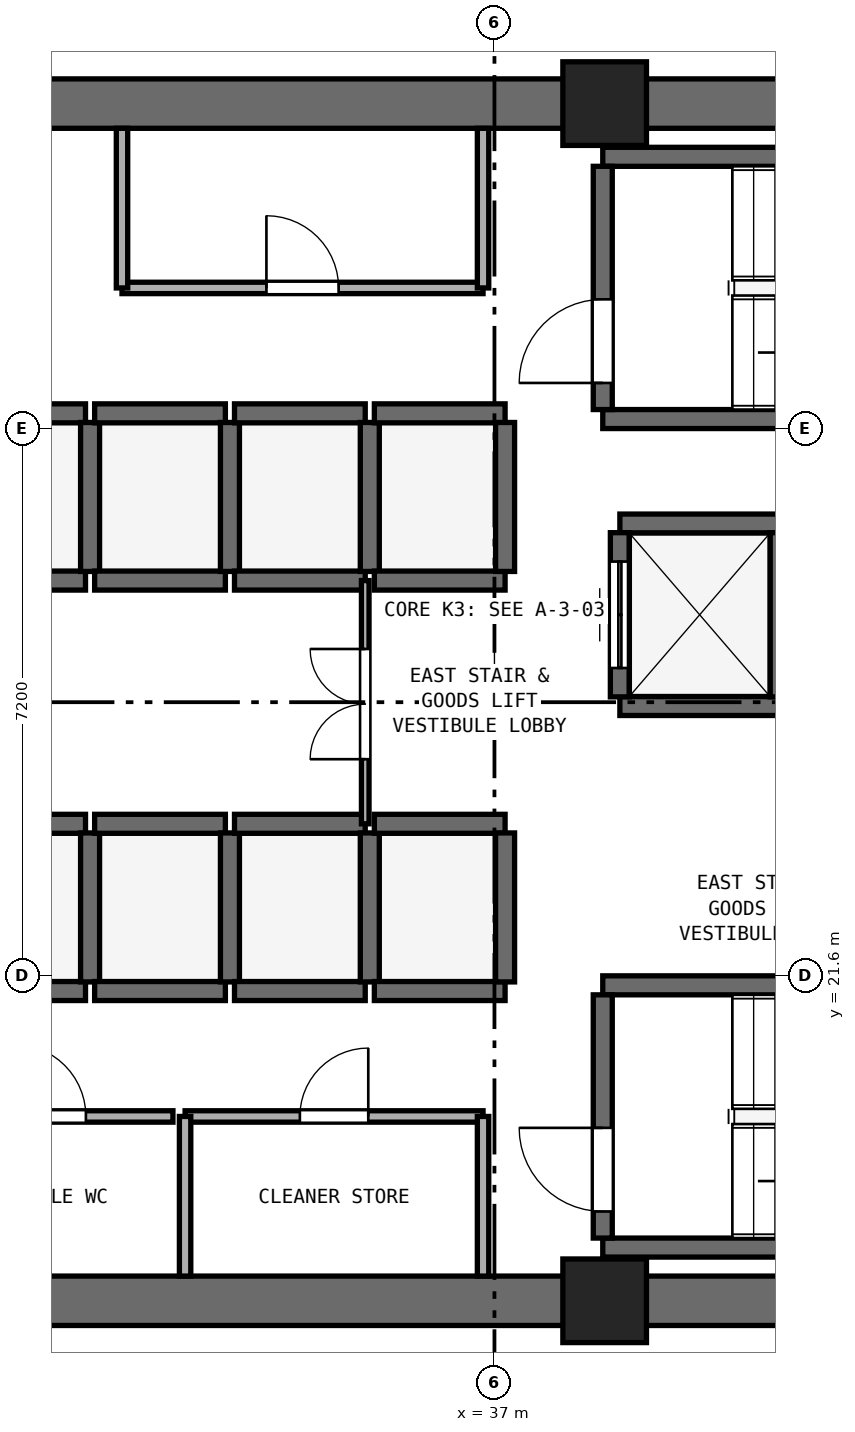
"""IFC4 building model, lengths in metres.
Left out: names, types, materials, properties, quantities, classifications, styles, units other than length and angle.
Written with IfcOpenShell. Run it as: python <this file> out.ifc"""

import sys

from ifc_helpers import new_model, si_unit, direction, frame, frame_2d, origin, origin_2d, place, context, subcontext, project, spatial, rectangle, extrude, element, fill, save


model = new_model("IFC4")
c1 = context("Model", 3, precision=1e-05, world=origin(), true_north=direction((0.0, 1.0)))
c2 = subcontext(c1, "Body", "Model", "MODEL_VIEW")
j1 = project(units=[si_unit("LENGTHUNIT", "METRE"), si_unit("PLANEANGLEUNIT", "RADIAN")], contexts=[c1])
p1 = place(None, origin())
s1 = spatial("IfcSite", under=j1, at=p1, CompositionType="ELEMENT")
p2 = place(p1, origin())
s2 = spatial("IfcBuilding", under=s1, at=p2, CompositionType="ELEMENT")
p3 = place(p2, frame((0.0, 0.0, 51.6)))
s3 = spatial("IfcBuildingStorey", under=s2, at=p3, CompositionType="ELEMENT", Elevation=51.6)
for number, where, z_axis, x_axis in (
    (1, (25.4, 17.325, 0.0), (0.0, 0.0, 1.0), (1.0, 0.0, 0.0)),
    (2, (25.4, 33.075, 0.0), (0.0, 0.0, 1.0), (1.0, 0.0, 0.0)),
):
    element("IfcWall", number, at=place(p3, frame(where, z_axis=z_axis, x_axis=x_axis)), inside=s3, PredefinedType="SHEAR", context=c2, shape_type="SweptSolid", body=[
        extrude(rectangle(XDim=23.2, YDim=0.65, at=frame_2d((11.6, 0.0))), origin(), (0.0, 0.0, 1.0), 3.525),
    ])
for number, where, z_axis, x_axis in (
    (3, (38.45, 17.325, 0.0), (0.0, 0.0, 1.0), (1.0, 0.0, 0.0)),
    (4, (38.45, 33.075, 0.0), (0.0, 0.0, 1.0), (1.0, 0.0, 0.0)),
):
    element("IfcColumn", number, at=place(p3, frame(where, z_axis=z_axis, x_axis=x_axis)), inside=s3, PredefinedType="PILASTER", context=c2, shape_type="SweptSolid", body=[
        extrude(rectangle(XDim=1.1, YDim=1.1, at=origin_2d()), origin(), (0.0, 0.0, 1.0), 3.8),
    ])
for number, where, z_axis, x_axis in (
    (5, (38.425, 28.925, 0.0), (0.0, 0.0, 1.0), (1.0, 0.0, 0.0)),
    (6, (38.425, 32.375, 0.0), (0.0, 0.0, 1.0), (1.0, 0.0, 0.0)),
):
    element("IfcWall", number, at=place(p3, frame(where, z_axis=z_axis, x_axis=x_axis)), inside=s3, PredefinedType="SHEAR", context=c2, shape_type="SweptSolid", body=[
        extrude(rectangle(XDim=7.3, YDim=0.25, at=frame_2d((3.65, 0.0))), origin(), (0.0, 0.0, 1.0), 3.525),
    ])
p4 = place(p3, frame((38.425, 29.05, 0.0), z_axis=(0.0, 0.0, 1.0), x_axis=(0.0, 1.0, 0.0)))
e7 = element("IfcWall", 7, at=p4, inside=s3, PredefinedType="SHEAR", context=c2, shape_type="SweptSolid", body=[
    extrude(rectangle(XDim=3.2, YDim=0.25, at=frame_2d((1.6, 0.0))), origin(), (0.0, 0.0, 1.0), 3.525),
])
p5 = place(p4, frame((0.35, 0.0, 0.0)))
e8 = element("IfcOpeningElement", 8, at=p5, cuts=e7, PredefinedType="OPENING", context=c2, shape_type="SweptSolid", body=[
    extrude(rectangle(XDim=1.1, YDim=2.15, at=frame_2d((0.55, 1.075))), frame((0.0, 0.135, 0.0), z_axis=(0.0, -1.0, 0.0), x_axis=(1.0, 0.0, 0.0)), (0.0, 0.0, 1.0), 0.27),
])
for number, where, z_axis, x_axis in (
    (9, (38.425, 18.025, 0.0), (0.0, 0.0, 1.0), (1.0, 0.0, 0.0)),
    (10, (38.425, 21.475, 0.0), (0.0, 0.0, 1.0), (1.0, 0.0, 0.0)),
):
    element("IfcWall", number, at=place(p3, frame(where, z_axis=z_axis, x_axis=x_axis)), inside=s3, PredefinedType="SHEAR", context=c2, shape_type="SweptSolid", body=[
        extrude(rectangle(XDim=7.3, YDim=0.25, at=frame_2d((3.65, 0.0))), origin(), (0.0, 0.0, 1.0), 3.525),
    ])
p6 = place(p3, frame((38.425, 18.15, 0.0), z_axis=(0.0, 0.0, 1.0), x_axis=(0.0, 1.0, 0.0)))
e11 = element("IfcWall", 11, at=p6, inside=s3, PredefinedType="SHEAR", context=c2, shape_type="SweptSolid", body=[
    extrude(rectangle(XDim=3.2, YDim=0.25, at=frame_2d((1.6, 0.0))), origin(), (0.0, 0.0, 1.0), 3.525),
])
p7 = place(p6, frame((0.35, 0.0, 0.0)))
e12 = element("IfcOpeningElement", 12, at=p7, cuts=e11, PredefinedType="OPENING", context=c2, shape_type="SweptSolid", body=[
    extrude(rectangle(XDim=1.1, YDim=2.15, at=frame_2d((0.55, 1.075))), frame((0.0, 0.135, 0.0), z_axis=(0.0, -1.0, 0.0), x_axis=(1.0, 0.0, 0.0)), (0.0, 0.0, 1.0), 0.27),
])
for number, where, z_axis, x_axis in (
    (13, (29.9, 21.4, 0.0), (0.0, 0.0, 1.0), (1.0, 0.0, 0.0)),
    (14, (29.9, 23.6, 0.0), (0.0, 0.0, 1.0), (1.0, 0.0, 0.0)),
):
    element("IfcWall", number, at=place(p3, frame(where, z_axis=z_axis, x_axis=x_axis)), inside=s3, PredefinedType="SHEAR", context=c2, shape_type="SweptSolid", body=[
        extrude(rectangle(XDim=1.72, YDim=0.25, at=frame_2d((0.86, 0.0))), origin(), (0.0, 0.0, 1.0), 3.525),
    ])
p8 = place(p3, frame((31.68, 21.52, 0.0), z_axis=(0.0, 0.0, 1.0), x_axis=(0.0, 1.0, 0.0)))
e15 = element("IfcWall", 15, at=p8, inside=s3, PredefinedType="SHEAR", context=c2, shape_type="SweptSolid", body=[
    extrude(rectangle(XDim=1.96, YDim=0.25, at=frame_2d((0.98, 0.0))), origin(), (0.0, 0.0, 1.0), 3.525),
])
for number, where, z_axis, x_axis in (
    (16, (31.74, 21.4, 0.0), (0.0, 0.0, 1.0), (1.0, 0.0, 0.0)),
    (17, (31.74, 23.6, 0.0), (0.0, 0.0, 1.0), (1.0, 0.0, 0.0)),
):
    element("IfcWall", number, at=place(p3, frame(where, z_axis=z_axis, x_axis=x_axis)), inside=s3, PredefinedType="SHEAR", context=c2, shape_type="SweptSolid", body=[
        extrude(rectangle(XDim=1.72, YDim=0.25, at=frame_2d((0.86, 0.0))), origin(), (0.0, 0.0, 1.0), 3.525),
    ])
p9 = place(p3, frame((33.52, 21.52, 0.0), z_axis=(0.0, 0.0, 1.0), x_axis=(0.0, 1.0, 0.0)))
e18 = element("IfcWall", 18, at=p9, inside=s3, PredefinedType="SHEAR", context=c2, shape_type="SweptSolid", body=[
    extrude(rectangle(XDim=1.96, YDim=0.25, at=frame_2d((0.98, 0.0))), origin(), (0.0, 0.0, 1.0), 3.525),
])
for number, where, z_axis, x_axis in (
    (19, (33.58, 21.4, 0.0), (0.0, 0.0, 1.0), (1.0, 0.0, 0.0)),
    (20, (33.58, 23.6, 0.0), (0.0, 0.0, 1.0), (1.0, 0.0, 0.0)),
):
    element("IfcWall", number, at=place(p3, frame(where, z_axis=z_axis, x_axis=x_axis)), inside=s3, PredefinedType="SHEAR", context=c2, shape_type="SweptSolid", body=[
        extrude(rectangle(XDim=1.72, YDim=0.25, at=frame_2d((0.86, 0.0))), origin(), (0.0, 0.0, 1.0), 3.525),
    ])
p10 = place(p3, frame((35.36, 21.52, 0.0), z_axis=(0.0, 0.0, 1.0), x_axis=(0.0, 1.0, 0.0)))
e21 = element("IfcWall", 21, at=p10, inside=s3, PredefinedType="SHEAR", context=c2, shape_type="SweptSolid", body=[
    extrude(rectangle(XDim=1.96, YDim=0.25, at=frame_2d((0.98, 0.0))), origin(), (0.0, 0.0, 1.0), 3.525),
])
for number, where, z_axis, x_axis in (
    (22, (35.42, 21.4, 0.0), (0.0, 0.0, 1.0), (1.0, 0.0, 0.0)),
    (23, (35.42, 23.6, 0.0), (0.0, 0.0, 1.0), (1.0, 0.0, 0.0)),
):
    element("IfcWall", number, at=place(p3, frame(where, z_axis=z_axis, x_axis=x_axis)), inside=s3, PredefinedType="SHEAR", context=c2, shape_type="SweptSolid", body=[
        extrude(rectangle(XDim=1.72, YDim=0.25, at=frame_2d((0.86, 0.0))), origin(), (0.0, 0.0, 1.0), 3.525),
    ])
p11 = place(p3, frame((37.14, 21.52, 0.0), z_axis=(0.0, 0.0, 1.0), x_axis=(0.0, 1.0, 0.0)))
e24 = element("IfcWall", 24, at=p11, inside=s3, PredefinedType="SHEAR", context=c2, shape_type="SweptSolid", body=[
    extrude(rectangle(XDim=1.96, YDim=0.25, at=frame_2d((0.98, 0.0))), origin(), (0.0, 0.0, 1.0), 3.525),
])
for number, where, z_axis, x_axis in (
    (25, (29.9, 26.8, 0.0), (0.0, 0.0, 1.0), (1.0, 0.0, 0.0)),
    (26, (29.9, 29.0, 0.0), (0.0, 0.0, 1.0), (1.0, 0.0, 0.0)),
):
    element("IfcWall", number, at=place(p3, frame(where, z_axis=z_axis, x_axis=x_axis)), inside=s3, PredefinedType="SHEAR", context=c2, shape_type="SweptSolid", body=[
        extrude(rectangle(XDim=1.72, YDim=0.25, at=frame_2d((0.86, 0.0))), origin(), (0.0, 0.0, 1.0), 3.525),
    ])
p12 = place(p3, frame((31.68, 26.92, 0.0), z_axis=(0.0, 0.0, 1.0), x_axis=(0.0, 1.0, 0.0)))
e27 = element("IfcWall", 27, at=p12, inside=s3, PredefinedType="SHEAR", context=c2, shape_type="SweptSolid", body=[
    extrude(rectangle(XDim=1.96, YDim=0.25, at=frame_2d((0.98, 0.0))), origin(), (0.0, 0.0, 1.0), 3.525),
])
for number, where, z_axis, x_axis in (
    (28, (31.74, 26.8, 0.0), (0.0, 0.0, 1.0), (1.0, 0.0, 0.0)),
    (29, (31.74, 29.0, 0.0), (0.0, 0.0, 1.0), (1.0, 0.0, 0.0)),
):
    element("IfcWall", number, at=place(p3, frame(where, z_axis=z_axis, x_axis=x_axis)), inside=s3, PredefinedType="SHEAR", context=c2, shape_type="SweptSolid", body=[
        extrude(rectangle(XDim=1.72, YDim=0.25, at=frame_2d((0.86, 0.0))), origin(), (0.0, 0.0, 1.0), 3.525),
    ])
p13 = place(p3, frame((33.52, 26.92, 0.0), z_axis=(0.0, 0.0, 1.0), x_axis=(0.0, 1.0, 0.0)))
e30 = element("IfcWall", 30, at=p13, inside=s3, PredefinedType="SHEAR", context=c2, shape_type="SweptSolid", body=[
    extrude(rectangle(XDim=1.96, YDim=0.25, at=frame_2d((0.98, 0.0))), origin(), (0.0, 0.0, 1.0), 3.525),
])
for number, where, z_axis, x_axis in (
    (31, (33.58, 26.8, 0.0), (0.0, 0.0, 1.0), (1.0, 0.0, 0.0)),
    (32, (33.58, 29.0, 0.0), (0.0, 0.0, 1.0), (1.0, 0.0, 0.0)),
):
    element("IfcWall", number, at=place(p3, frame(where, z_axis=z_axis, x_axis=x_axis)), inside=s3, PredefinedType="SHEAR", context=c2, shape_type="SweptSolid", body=[
        extrude(rectangle(XDim=1.72, YDim=0.25, at=frame_2d((0.86, 0.0))), origin(), (0.0, 0.0, 1.0), 3.525),
    ])
p14 = place(p3, frame((35.36, 26.92, 0.0), z_axis=(0.0, 0.0, 1.0), x_axis=(0.0, 1.0, 0.0)))
e33 = element("IfcWall", 33, at=p14, inside=s3, PredefinedType="SHEAR", context=c2, shape_type="SweptSolid", body=[
    extrude(rectangle(XDim=1.96, YDim=0.25, at=frame_2d((0.98, 0.0))), origin(), (0.0, 0.0, 1.0), 3.525),
])
for number, where, z_axis, x_axis in (
    (34, (35.42, 26.8, 0.0), (0.0, 0.0, 1.0), (1.0, 0.0, 0.0)),
    (35, (35.42, 29.0, 0.0), (0.0, 0.0, 1.0), (1.0, 0.0, 0.0)),
):
    element("IfcWall", number, at=place(p3, frame(where, z_axis=z_axis, x_axis=x_axis)), inside=s3, PredefinedType="SHEAR", context=c2, shape_type="SweptSolid", body=[
        extrude(rectangle(XDim=1.72, YDim=0.25, at=frame_2d((0.86, 0.0))), origin(), (0.0, 0.0, 1.0), 3.525),
    ])
p15 = place(p3, frame((37.14, 26.92, 0.0), z_axis=(0.0, 0.0, 1.0), x_axis=(0.0, 1.0, 0.0)))
e36 = element("IfcWall", 36, at=p15, inside=s3, PredefinedType="SHEAR", context=c2, shape_type="SweptSolid", body=[
    extrude(rectangle(XDim=1.96, YDim=0.25, at=frame_2d((0.98, 0.0))), origin(), (0.0, 0.0, 1.0), 3.525),
])
for number, where, z_axis, x_axis in (
    (37, (38.65, 25.15, 0.0), (0.0, 0.0, 1.0), (1.0, 0.0, 0.0)),
    (38, (38.65, 27.55, 0.0), (0.0, 0.0, 1.0), (1.0, 0.0, 0.0)),
):
    element("IfcWall", number, at=place(p3, frame(where, z_axis=z_axis, x_axis=x_axis)), inside=s3, PredefinedType="SHEAR", context=c2, shape_type="SweptSolid", body=[
        extrude(rectangle(XDim=2.1, YDim=0.25, at=frame_2d((1.05, 0.0))), origin(), (0.0, 0.0, 1.0), 3.525),
    ])
p16 = place(p3, frame((38.65, 25.27, 0.0), z_axis=(0.0, 0.0, 1.0), x_axis=(0.0, 1.0, 0.0)))
e39 = element("IfcWall", 39, at=p16, inside=s3, PredefinedType="SHEAR", context=c2, shape_type="SweptSolid", body=[
    extrude(rectangle(XDim=2.16, YDim=0.25, at=frame_2d((1.08, 0.0))), origin(), (0.0, 0.0, 1.0), 3.525),
])
p17 = place(p16, frame((0.38, 0.0, 0.0)))
e40 = element("IfcOpeningElement", 40, at=p17, cuts=e39, PredefinedType="OPENING", context=c2, shape_type="SweptSolid", body=[
    extrude(rectangle(XDim=1.4, YDim=2.2, at=frame_2d((0.7, 1.1))), frame((0.0, 0.135, 0.0), z_axis=(0.0, -1.0, 0.0), x_axis=(1.0, 0.0, 0.0)), (0.0, 0.0, 1.0), 0.27),
])
p18 = place(p3, frame((40.75, 25.27, 0.0), z_axis=(0.0, 0.0, 1.0), x_axis=(0.0, 1.0, 0.0)))
e41 = element("IfcWall", 41, at=p18, inside=s3, PredefinedType="SHEAR", context=c2, shape_type="SweptSolid", body=[
    extrude(rectangle(XDim=2.16, YDim=0.25, at=frame_2d((1.08, 0.0))), origin(), (0.0, 0.0, 1.0), 3.525),
])
p19 = place(p3, frame((32.1, 30.65, 0.0), z_axis=(0.0, 0.0, 1.0), x_axis=(1.0, 0.0, 0.0)))
e42 = element("IfcWall", 42, at=p19, inside=s3, PredefinedType="PARTITIONING", context=c2, shape_type="SweptSolid", body=[
    extrude(rectangle(XDim=4.75, YDim=0.15, at=frame_2d((2.375, 0.0))), origin(), (0.0, 0.0, 1.0), 3.525),
])
p20 = place(p19, frame((1.9, 0.0, 0.0)))
e43 = element("IfcOpeningElement", 43, at=p20, cuts=e42, PredefinedType="OPENING", context=c2, shape_type="SweptSolid", body=[
    extrude(rectangle(XDim=0.95, YDim=2.1, at=frame_2d((0.475, 1.05))), frame((0.0, 0.085, 0.0), z_axis=(0.0, -1.0, 0.0), x_axis=(1.0, 0.0, 0.0)), (0.0, 0.0, 1.0), 0.17),
])
for number, where, z_axis, x_axis in (
    (44, (32.1, 30.65, 0.0), (0.0, 0.0, 1.0), (0.0, 1.0, 0.0)),
    (45, (36.85, 30.65, 0.0), (0.0, 0.0, 1.0), (0.0, 1.0, 0.0)),
):
    element("IfcWall", number, at=place(p3, frame(where, z_axis=z_axis, x_axis=x_axis)), inside=s3, PredefinedType="PARTITIONING", context=c2, shape_type="SweptSolid", body=[
        extrude(rectangle(XDim=2.1, YDim=0.15, at=frame_2d((1.05, 0.0))), origin(), (0.0, 0.0, 1.0), 3.525),
    ])
p21 = place(p3, frame((29.53, 19.75, 0.0), z_axis=(0.0, 0.0, 1.0), x_axis=(1.0, 0.0, 0.0)))
e46 = element("IfcWall", 46, at=p21, inside=s3, PredefinedType="PARTITIONING", context=c2, shape_type="SweptSolid", body=[
    extrude(rectangle(XDim=3.24, YDim=0.15, at=frame_2d((1.62, 0.0))), origin(), (0.0, 0.0, 1.0), 3.525),
])
p22 = place(p21, frame((1.145, 0.0, 0.0)))
e47 = element("IfcOpeningElement", 47, at=p22, cuts=e46, PredefinedType="OPENING", context=c2, shape_type="SweptSolid", body=[
    extrude(rectangle(XDim=0.95, YDim=2.1, at=frame_2d((0.475, 1.05))), frame((0.0, 0.085, 0.0), z_axis=(0.0, -1.0, 0.0), x_axis=(1.0, 0.0, 0.0)), (0.0, 0.0, 1.0), 0.17),
])
p23 = place(p3, frame((32.93, 19.75, 0.0), z_axis=(0.0, 0.0, 1.0), x_axis=(1.0, 0.0, 0.0)))
e48 = element("IfcWall", 48, at=p23, inside=s3, PredefinedType="PARTITIONING", context=c2, shape_type="SweptSolid", body=[
    extrude(rectangle(XDim=3.92, YDim=0.15, at=frame_2d((1.96, 0.0))), origin(), (0.0, 0.0, 1.0), 3.525),
])
p24 = place(p23, frame((1.51, 0.0, 0.0)))
e49 = element("IfcOpeningElement", 49, at=p24, cuts=e48, PredefinedType="OPENING", context=c2, shape_type="SweptSolid", body=[
    extrude(rectangle(XDim=0.9, YDim=2.1, at=frame_2d((0.45, 1.05))), frame((0.0, 0.085, 0.0), z_axis=(0.0, -1.0, 0.0), x_axis=(1.0, 0.0, 0.0)), (0.0, 0.0, 1.0), 0.17),
])
for number, where, z_axis, x_axis in (
    (50, (32.93, 17.65, 0.0), (0.0, 0.0, 1.0), (0.0, 1.0, 0.0)),
    (51, (36.85, 17.65, 0.0), (0.0, 0.0, 1.0), (0.0, 1.0, 0.0)),
):
    element("IfcWall", number, at=place(p3, frame(where, z_axis=z_axis, x_axis=x_axis)), inside=s3, PredefinedType="PARTITIONING", context=c2, shape_type="SweptSolid", body=[
        extrude(rectangle(XDim=2.1, YDim=0.15, at=frame_2d((1.05, 0.0))), origin(), (0.0, 0.0, 1.0), 3.525),
    ])
p25 = place(p3, frame((35.3, 23.6, 0.0), z_axis=(0.0, 0.0, 1.0), x_axis=(0.0, 1.0, 0.0)))
e52 = element("IfcWall", 52, at=p25, inside=s3, PredefinedType="PARTITIONING", context=c2, shape_type="SweptSolid", body=[
    extrude(rectangle(XDim=3.2, YDim=0.1, at=frame_2d((1.6, 0.0))), origin(), (0.0, 0.0, 1.0), 3.525),
])
p26 = place(p25, frame((0.85, 0.0, 0.0)))
e53 = element("IfcOpeningElement", 53, at=p26, cuts=e52, PredefinedType="OPENING", context=c2, shape_type="SweptSolid", body=[
    extrude(rectangle(XDim=1.45, YDim=2.12, at=frame_2d((0.725, 1.06))), frame((0.0, 0.06, 0.0), z_axis=(0.0, -1.0, 0.0), x_axis=(1.0, 0.0, 0.0)), (0.0, 0.0, 1.0), 0.12),
])
p27 = place(p5, origin())
e54 = element("IfcDoor", 54, at=p27, inside=s3, OperationType="SINGLE_SWING_LEFT", PredefinedType="DOOR", context=c2, shape_type="SweptSolid", body=[
    extrude(rectangle(XDim=1.1, YDim=2.15, at=frame_2d((0.55, 1.075))), frame((0.0, 0.025, 0.0), z_axis=(0.0, -1.0, 0.0), x_axis=(1.0, 0.0, 0.0)), (0.0, 0.0, 1.0), 0.05),
])
fill(e8, e54)
p28 = place(p7, origin())
e55 = element("IfcDoor", 55, at=p28, inside=s3, OperationType="SINGLE_SWING_RIGHT", PredefinedType="DOOR", context=c2, shape_type="SweptSolid", body=[
    extrude(rectangle(XDim=1.1, YDim=2.15, at=frame_2d((0.55, 1.075))), frame((0.0, 0.025, 0.0), z_axis=(0.0, -1.0, 0.0), x_axis=(1.0, 0.0, 0.0)), (0.0, 0.0, 1.0), 0.05),
])
fill(e12, e55)
p29 = place(p17, origin())
e56 = element("IfcDoor", 56, at=p29, inside=s3, OperationType="DOUBLE_DOOR_SLIDING", PredefinedType="DOOR", context=c2, shape_type="SweptSolid", body=[
    extrude(rectangle(XDim=1.4, YDim=2.2, at=frame_2d((0.7, 1.1))), frame((0.0, 0.025, 0.0), z_axis=(0.0, -1.0, 0.0), x_axis=(1.0, 0.0, 0.0)), (0.0, 0.0, 1.0), 0.05),
])
fill(e40, e56)
p30 = place(p20, origin())
e57 = element("IfcDoor", 57, at=p30, inside=s3, OperationType="SINGLE_SWING_LEFT", PredefinedType="DOOR", context=c2, shape_type="SweptSolid", body=[
    extrude(rectangle(XDim=0.95, YDim=2.1, at=frame_2d((0.475, 1.05))), frame((0.0, 0.025, 0.0), z_axis=(0.0, -1.0, 0.0), x_axis=(1.0, 0.0, 0.0)), (0.0, 0.0, 1.0), 0.05),
])
fill(e43, e57)
p31 = place(p22, origin())
e58 = element("IfcDoor", 58, at=p31, inside=s3, OperationType="SINGLE_SWING_LEFT", PredefinedType="DOOR", context=c2, shape_type="SweptSolid", body=[
    extrude(rectangle(XDim=0.95, YDim=2.1, at=frame_2d((0.475, 1.05))), frame((0.0, 0.025, 0.0), z_axis=(0.0, -1.0, 0.0), x_axis=(1.0, 0.0, 0.0)), (0.0, 0.0, 1.0), 0.05),
])
fill(e47, e58)
p32 = place(p24, origin())
e59 = element("IfcDoor", 59, at=p32, inside=s3, OperationType="SINGLE_SWING_RIGHT", PredefinedType="DOOR", context=c2, shape_type="SweptSolid", body=[
    extrude(rectangle(XDim=0.9, YDim=2.1, at=frame_2d((0.45, 1.05))), frame((0.0, 0.025, 0.0), z_axis=(0.0, -1.0, 0.0), x_axis=(1.0, 0.0, 0.0)), (0.0, 0.0, 1.0), 0.05),
])
fill(e49, e59)
p33 = place(p26, origin())
e60 = element("IfcDoor", 60, at=p33, inside=s3, OperationType="DOUBLE_DOOR_SINGLE_SWING", PredefinedType="DOOR", context=c2, shape_type="SweptSolid", body=[
    extrude(rectangle(XDim=1.45, YDim=2.12, at=frame_2d((0.725, 1.06))), frame((0.0, 0.025, 0.0), z_axis=(0.0, -1.0, 0.0), x_axis=(1.0, 0.0, 0.0)), (0.0, 0.0, 1.0), 0.05),
])
fill(e53, e60)
save(model, sys.argv[1])
